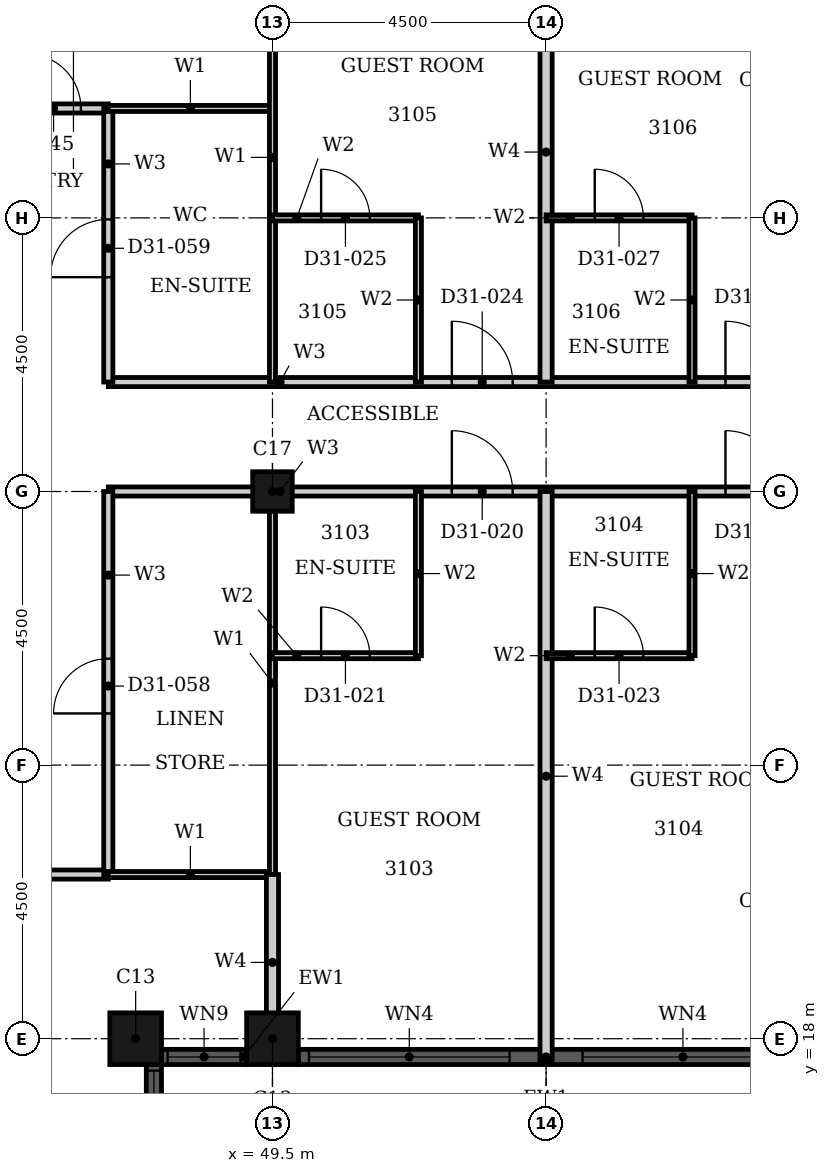
"""IFC4 building model, lengths in metres.
Left out: names, types, materials, properties, quantities, classifications, styles, units other than length and angle.
Written with IfcOpenShell. Run it as: python <this file> out.ifc"""

import sys

from ifc_helpers import new_model, si_unit, direction, frame, frame_2d, origin, origin_2d, place, context, subcontext, project, spatial, rectangle, hollow_rectangle, extrude, element, fill, save


model = new_model("IFC4")
c1 = context("Model", 3, precision=1e-05, world=origin(), true_north=direction((0.0, 1.0)))
c2 = subcontext(c1, "Body", "Model", "MODEL_VIEW")
j1 = project(units=[si_unit("LENGTHUNIT", "METRE"), si_unit("PLANEANGLEUNIT", "RADIAN")], contexts=[c1])
p1 = place(None, origin())
s1 = spatial("IfcSite", under=j1, at=p1, CompositionType="ELEMENT")
p2 = place(p1, origin())
s2 = spatial("IfcBuilding", under=s1, at=p2, CompositionType="ELEMENT")
p3 = place(p2, frame((0.0, 0.0, 126.0)))
s3 = spatial("IfcBuildingStorey", under=s2, at=p3, CompositionType="ELEMENT", Elevation=126.0)
for number, where, z_axis, x_axis in (
    (1, (47.25, 18.0, 0.0), (0.0, 0.0, 1.0), (1.0, 0.0, 0.0)),
    (2, (49.5, 18.0, 0.0), (0.0, 0.0, 1.0), (1.0, 0.0, 0.0)),
):
    element("IfcColumn", number, at=place(p3, frame(where, z_axis=z_axis, x_axis=x_axis)), inside=s3, PredefinedType="COLUMN", context=c2, shape_type="SweptSolid", body=[
        extrude(hollow_rectangle(XDim=0.85, YDim=0.85, WallThickness=0.026, at=origin_2d()), origin(), (0.0, 0.0, 1.0), 3.6),
    ])
p4 = place(p3, frame((49.5, 27.0, 0.0), z_axis=(0.0, 0.0, 1.0), x_axis=(1.0, 0.0, 0.0)))
e3 = element("IfcColumn", 3, at=p4, inside=s3, PredefinedType="COLUMN", context=c2, shape_type="SweptSolid", body=[
    extrude(hollow_rectangle(XDim=0.65, YDim=0.65, WallThickness=0.021, at=origin_2d()), origin(), (0.0, 0.0, 1.0), 3.6),
])
p5 = place(p3, frame((47.55, 16.175, 0.0), z_axis=(0.0, 0.0, 1.0), x_axis=(0.0, 1.0, 0.0)))
e4 = element("IfcWall", 4, at=p5, inside=s3, PredefinedType="SOLIDWALL", context=c2, shape_type="SweptSolid", body=[
    extrude(rectangle(XDim=1.4, YDim=0.25, at=frame_2d((0.7, 0.0))), origin(), (0.0, 0.0, 1.0), 3.6),
])
p6 = place(p5, frame((0.1, 0.0, 0.9)))
e5 = element("IfcOpeningElement", 5, at=p6, cuts=e4, PredefinedType="OPENING", context=c2, shape_type="SweptSolid", body=[
    extrude(rectangle(XDim=1.2, YDim=2.08, at=frame_2d((0.6, 1.04))), frame((0.0, 0.135, 0.0), z_axis=(0.0, -1.0, 0.0), x_axis=(1.0, 0.0, 0.0)), (0.0, 0.0, 1.0), 0.27),
])
p7 = place(p3, frame((47.675, 17.7, 0.0), z_axis=(0.0, 0.0, 1.0), x_axis=(1.0, 0.0, 0.0)))
e6 = element("IfcWall", 6, at=p7, inside=s3, PredefinedType="SOLIDWALL", context=c2, shape_type="SweptSolid", body=[
    extrude(rectangle(XDim=1.4, YDim=0.25, at=frame_2d((0.7, 0.0))), origin(), (0.0, 0.0, 1.0), 3.6),
])
p8 = place(p7, frame((0.1, 0.0, 0.9)))
e7 = element("IfcOpeningElement", 7, at=p8, cuts=e6, PredefinedType="OPENING", context=c2, shape_type="SweptSolid", body=[
    extrude(rectangle(XDim=1.2, YDim=2.08, at=frame_2d((0.6, 1.04))), frame((0.0, 0.135, 0.0), z_axis=(0.0, -1.0, 0.0), x_axis=(1.0, 0.0, 0.0)), (0.0, 0.0, 1.0), 0.27),
])
p9 = place(p3, frame((49.925, 17.7, 0.0), z_axis=(0.0, 0.0, 1.0), x_axis=(1.0, 0.0, 0.0)))
e8 = element("IfcWall", 8, at=p9, inside=s3, PredefinedType="SOLIDWALL", context=c2, shape_type="SweptSolid", body=[
    extrude(rectangle(XDim=8.15, YDim=0.25, at=frame_2d((4.075, 0.0))), origin(), (0.0, 0.0, 1.0), 3.6),
])
p10 = place(p9, frame((0.175, 0.0, 0.9)))
e9 = element("IfcOpeningElement", 9, at=p10, cuts=e8, PredefinedType="OPENING", context=c2, shape_type="SweptSolid", body=[
    extrude(rectangle(XDim=3.3, YDim=2.08, at=frame_2d((1.65, 1.04))), frame((0.0, 0.135, 0.0), z_axis=(0.0, -1.0, 0.0), x_axis=(1.0, 0.0, 0.0)), (0.0, 0.0, 1.0), 0.27),
])
p11 = place(p9, frame((4.675, 0.0, 0.9)))
e10 = element("IfcOpeningElement", 10, at=p11, cuts=e8, PredefinedType="OPENING", context=c2, shape_type="SweptSolid", body=[
    extrude(rectangle(XDim=3.3, YDim=2.08, at=frame_2d((1.65, 1.04))), frame((0.0, 0.135, 0.0), z_axis=(0.0, -1.0, 0.0), x_axis=(1.0, 0.0, 0.0)), (0.0, 0.0, 1.0), 0.27),
])
p12 = place(p3, frame((31.5, 20.7, 0.0), z_axis=(0.0, 0.0, 1.0), x_axis=(1.0, 0.0, 0.0)))
e11 = element("IfcWall", 11, at=p12, inside=s3, PredefinedType="PARTITIONING", context=c2, shape_type="SweptSolid", body=[
    extrude(rectangle(XDim=15.3, YDim=0.15, at=frame_2d((7.65, 0.0))), origin(), (0.0, 0.0, 1.0), 3.3),
])
p13 = place(p12, frame((11.95, 0.0, 0.0)))
e12 = element("IfcOpeningElement", 12, at=p13, cuts=e11, PredefinedType="OPENING", context=c2, shape_type="SweptSolid", body=[
    extrude(rectangle(XDim=1.0, YDim=2.1, at=frame_2d((0.5, 1.05))), frame((0.0, 0.085, 0.0), z_axis=(0.0, -1.0, 0.0), x_axis=(1.0, 0.0, 0.0)), (0.0, 0.0, 1.0), 0.17),
])
p14 = place(p12, frame((4.05, 0.0, 0.0)))
e13 = element("IfcOpeningElement", 13, at=p14, cuts=e11, PredefinedType="OPENING", context=c2, shape_type="SweptSolid", body=[
    extrude(rectangle(XDim=0.9, YDim=2.1, at=frame_2d((0.45, 1.05))), frame((0.0, 0.085, 0.0), z_axis=(0.0, -1.0, 0.0), x_axis=(1.0, 0.0, 0.0)), (0.0, 0.0, 1.0), 0.17),
])
p15 = place(p3, frame((46.8, 27.0, 0.0), z_axis=(0.0, 0.0, 1.0), x_axis=(1.0, 0.0, 0.0)))
e14 = element("IfcWall", 14, at=p15, inside=s3, PredefinedType="PARTITIONING", context=c2, shape_type="SweptSolid", body=[
    extrude(rectangle(XDim=11.7, YDim=0.15, at=frame_2d((5.85, 0.0))), origin(), (0.0, 0.0, 1.0), 2.58),
])
p16 = place(p15, frame((5.65, 0.0, 0.0)))
e15 = element("IfcOpeningElement", 15, at=p16, cuts=e14, PredefinedType="OPENING", context=c2, shape_type="SweptSolid", body=[
    extrude(rectangle(XDim=1.0, YDim=2.1, at=frame_2d((0.5, 1.05))), frame((0.0, 0.085, 0.0), z_axis=(0.0, -1.0, 0.0), x_axis=(1.0, 0.0, 0.0)), (0.0, 0.0, 1.0), 0.17),
])
p17 = place(p15, frame((10.15, 0.0, 0.0)))
e16 = element("IfcOpeningElement", 16, at=p17, cuts=e14, PredefinedType="OPENING", context=c2, shape_type="SweptSolid", body=[
    extrude(rectangle(XDim=1.0, YDim=2.1, at=frame_2d((0.5, 1.05))), frame((0.0, 0.085, 0.0), z_axis=(0.0, -1.0, 0.0), x_axis=(1.0, 0.0, 0.0)), (0.0, 0.0, 1.0), 0.17),
])
p18 = place(p3, frame((46.8, 28.8, 0.0), z_axis=(0.0, 0.0, 1.0), x_axis=(1.0, 0.0, 0.0)))
e17 = element("IfcWall", 17, at=p18, inside=s3, PredefinedType="PARTITIONING", context=c2, shape_type="SweptSolid", body=[
    extrude(rectangle(XDim=11.7, YDim=0.15, at=frame_2d((5.85, 0.0))), origin(), (0.0, 0.0, 1.0), 3.3),
])
p19 = place(p18, frame((5.65, 0.0, 0.0)))
e18 = element("IfcOpeningElement", 18, at=p19, cuts=e17, PredefinedType="OPENING", context=c2, shape_type="SweptSolid", body=[
    extrude(rectangle(XDim=1.0, YDim=2.1, at=frame_2d((0.5, 1.05))), frame((0.0, 0.085, 0.0), z_axis=(0.0, -1.0, 0.0), x_axis=(1.0, 0.0, 0.0)), (0.0, 0.0, 1.0), 0.17),
])
p20 = place(p18, frame((10.15, 0.0, 0.0)))
e19 = element("IfcOpeningElement", 19, at=p20, cuts=e17, PredefinedType="OPENING", context=c2, shape_type="SweptSolid", body=[
    extrude(rectangle(XDim=1.0, YDim=2.1, at=frame_2d((0.5, 1.05))), frame((0.0, 0.085, 0.0), z_axis=(0.0, -1.0, 0.0), x_axis=(1.0, 0.0, 0.0)), (0.0, 0.0, 1.0), 0.17),
])
p21 = place(p3, frame((40.5, 33.3, 0.0), z_axis=(0.0, 0.0, 1.0), x_axis=(1.0, 0.0, 0.0)))
e20 = element("IfcWall", 20, at=p21, inside=s3, PredefinedType="PARTITIONING", context=c2, shape_type="SweptSolid", body=[
    extrude(rectangle(XDim=6.3, YDim=0.15, at=frame_2d((3.15, 0.0))), origin(), (0.0, 0.0, 1.0), 3.3),
])
p22 = place(p21, frame((2.95, 0.0, 0.0)))
e21 = element("IfcOpeningElement", 21, at=p22, cuts=e20, PredefinedType="OPENING", context=c2, shape_type="SweptSolid", body=[
    extrude(rectangle(XDim=1.0, YDim=2.1, at=frame_2d((0.5, 1.05))), frame((0.0, 0.085, 0.0), z_axis=(0.0, -1.0, 0.0), x_axis=(1.0, 0.0, 0.0)), (0.0, 0.0, 1.0), 0.17),
])
p23 = place(p21, frame((4.95, 0.0, 0.0)))
e22 = element("IfcOpeningElement", 22, at=p23, cuts=e20, PredefinedType="OPENING", context=c2, shape_type="SweptSolid", body=[
    extrude(rectangle(XDim=0.9, YDim=2.1, at=frame_2d((0.45, 1.05))), frame((0.0, 0.085, 0.0), z_axis=(0.0, -1.0, 0.0), x_axis=(1.0, 0.0, 0.0)), (0.0, 0.0, 1.0), 0.17),
])
p24 = place(p3, frame((46.8, 28.8, 0.0), z_axis=(0.0, 0.0, 1.0), x_axis=(0.0, 1.0, 0.0)))
e23 = element("IfcWall", 23, at=p24, inside=s3, PredefinedType="PARTITIONING", context=c2, shape_type="SweptSolid", body=[
    extrude(rectangle(XDim=4.5, YDim=0.15, at=frame_2d((2.25, 0.0))), origin(), (0.0, 0.0, 1.0), 3.3),
])
p25 = place(p24, frame((1.725, 0.0, 0.0)))
e24 = element("IfcOpeningElement", 24, at=p25, cuts=e23, PredefinedType="OPENING", context=c2, shape_type="SweptSolid", body=[
    extrude(rectangle(XDim=0.95, YDim=2.1, at=frame_2d((0.475, 1.05))), frame((0.0, 0.085, 0.0), z_axis=(0.0, -1.0, 0.0), x_axis=(1.0, 0.0, 0.0)), (0.0, 0.0, 1.0), 0.17),
])
p26 = place(p3, frame((46.8, 20.7, 0.0), z_axis=(0.0, 0.0, 1.0), x_axis=(0.0, 1.0, 0.0)))
e25 = element("IfcWall", 25, at=p26, inside=s3, PredefinedType="PARTITIONING", context=c2, shape_type="SweptSolid", body=[
    extrude(rectangle(XDim=6.3, YDim=0.15, at=frame_2d((3.15, 0.0))), origin(), (0.0, 0.0, 1.0), 3.3),
])
p27 = place(p26, frame((2.65, 0.0, 0.0)))
e26 = element("IfcOpeningElement", 26, at=p27, cuts=e25, PredefinedType="OPENING", context=c2, shape_type="SweptSolid", body=[
    extrude(rectangle(XDim=0.9, YDim=2.1, at=frame_2d((0.45, 1.05))), frame((0.0, 0.085, 0.0), z_axis=(0.0, -1.0, 0.0), x_axis=(1.0, 0.0, 0.0)), (0.0, 0.0, 1.0), 0.17),
])
for number, where, z_axis, x_axis in (
    (27, (46.8, 20.7, 0.0), (0.0, 0.0, 1.0), (1.0, 0.0, 0.0)),
    (28, (46.8, 33.3, 0.0), (0.0, 0.0, 1.0), (1.0, 0.0, 0.0)),
):
    element("IfcWall", number, at=place(p3, frame(where, z_axis=z_axis, x_axis=x_axis)), inside=s3, PredefinedType="PARTITIONING", context=c2, shape_type="SweptSolid", body=[
        extrude(rectangle(XDim=2.7, YDim=0.1, at=frame_2d((1.35, 0.0))), origin(), (0.0, 0.0, 1.0), 3.3),
    ])
p28 = place(p3, frame((49.5, 28.8, 0.0), z_axis=(0.0, 0.0, 1.0), x_axis=(0.0, 1.0, 0.0)))
e29 = element("IfcWall", 29, at=p28, inside=s3, PredefinedType="PARTITIONING", context=c2, shape_type="SweptSolid", body=[
    extrude(rectangle(XDim=7.39, YDim=0.1, at=frame_2d((3.695, 0.0))), origin(), (0.0, 0.0, 1.0), 2.38),
])
p29 = place(p3, frame((49.5, 20.7, 0.0), z_axis=(0.0, 0.0, 1.0), x_axis=(0.0, 1.0, 0.0)))
e30 = element("IfcWall", 30, at=p29, inside=s3, PredefinedType="PARTITIONING", context=c2, shape_type="SweptSolid", body=[
    extrude(rectangle(XDim=6.3, YDim=0.1, at=frame_2d((3.15, 0.0))), origin(), (0.0, 0.0, 1.0), 2.38),
])
p30 = place(p3, frame((49.5, 17.81, 0.0), z_axis=(0.0, 0.0, 1.0), x_axis=(0.0, 1.0, 0.0)))
e31 = element("IfcWall", 31, at=p30, inside=s3, PredefinedType="PARTITIONING", context=c2, shape_type="SweptSolid", body=[
    extrude(rectangle(XDim=2.89, YDim=0.2, at=frame_2d((1.445, 0.0))), origin(), (0.0, 0.0, 1.0), 2.38),
])
p31 = place(p3, frame((54.0, 28.8, 0.0), z_axis=(0.0, 0.0, 1.0), x_axis=(0.0, 1.0, 0.0)))
e32 = element("IfcWall", 32, at=p31, inside=s3, PredefinedType="PARTITIONING", context=c2, shape_type="SweptSolid", body=[
    extrude(rectangle(XDim=7.565, YDim=0.2, at=frame_2d((3.782, 0.0))), origin(), (0.0, 0.0, 1.0), 3.3),
])
p32 = place(p3, frame((54.0, 17.635, 0.0), z_axis=(0.0, 0.0, 1.0), x_axis=(0.0, 1.0, 0.0)))
e33 = element("IfcWall", 33, at=p32, inside=s3, PredefinedType="PARTITIONING", context=c2, shape_type="SweptSolid", body=[
    extrude(rectangle(XDim=9.365, YDim=0.2, at=frame_2d((4.683, 0.0))), origin(), (0.0, 0.0, 1.0), 3.3),
])
p33 = place(p3, frame((49.5, 24.3, 0.0), z_axis=(0.0, 0.0, 1.0), x_axis=(1.0, 0.0, 0.0)))
e34 = element("IfcWall", 34, at=p33, inside=s3, PredefinedType="PARTITIONING", context=c2, shape_type="SweptSolid", body=[
    extrude(rectangle(XDim=2.4, YDim=0.1, at=frame_2d((1.2, 0.0))), origin(), (0.0, 0.0, 1.0), 3.3),
])
p34 = place(p33, frame((0.8, 0.0, 0.0)))
e35 = element("IfcOpeningElement", 35, at=p34, cuts=e34, PredefinedType="OPENING", context=c2, shape_type="SweptSolid", body=[
    extrude(rectangle(XDim=0.8, YDim=2.1, at=frame_2d((0.4, 1.05))), frame((0.0, 0.06, 0.0), z_axis=(0.0, -1.0, 0.0), x_axis=(1.0, 0.0, 0.0)), (0.0, 0.0, 1.0), 0.12),
])
p35 = place(p3, frame((54.0, 24.3, 0.0), z_axis=(0.0, 0.0, 1.0), x_axis=(1.0, 0.0, 0.0)))
e36 = element("IfcWall", 36, at=p35, inside=s3, PredefinedType="PARTITIONING", context=c2, shape_type="SweptSolid", body=[
    extrude(rectangle(XDim=2.4, YDim=0.1, at=frame_2d((1.2, 0.0))), origin(), (0.0, 0.0, 1.0), 3.3),
])
p36 = place(p35, frame((0.8, 0.0, 0.0)))
e37 = element("IfcOpeningElement", 37, at=p36, cuts=e36, PredefinedType="OPENING", context=c2, shape_type="SweptSolid", body=[
    extrude(rectangle(XDim=0.8, YDim=2.1, at=frame_2d((0.4, 1.05))), frame((0.0, 0.06, 0.0), z_axis=(0.0, -1.0, 0.0), x_axis=(1.0, 0.0, 0.0)), (0.0, 0.0, 1.0), 0.12),
])
p37 = place(p3, frame((49.5, 31.5, 0.0), z_axis=(0.0, 0.0, 1.0), x_axis=(1.0, 0.0, 0.0)))
e38 = element("IfcWall", 38, at=p37, inside=s3, PredefinedType="PARTITIONING", context=c2, shape_type="SweptSolid", body=[
    extrude(rectangle(XDim=2.4, YDim=0.1, at=frame_2d((1.2, 0.0))), origin(), (0.0, 0.0, 1.0), 2.58),
])
p38 = place(p37, frame((0.8, 0.0, 0.0)))
e39 = element("IfcOpeningElement", 39, at=p38, cuts=e38, PredefinedType="OPENING", context=c2, shape_type="SweptSolid", body=[
    extrude(rectangle(XDim=0.8, YDim=2.1, at=frame_2d((0.4, 1.05))), frame((0.0, 0.06, 0.0), z_axis=(0.0, -1.0, 0.0), x_axis=(1.0, 0.0, 0.0)), (0.0, 0.0, 1.0), 0.12),
])
p39 = place(p3, frame((54.0, 31.5, 0.0), z_axis=(0.0, 0.0, 1.0), x_axis=(1.0, 0.0, 0.0)))
e40 = element("IfcWall", 40, at=p39, inside=s3, PredefinedType="PARTITIONING", context=c2, shape_type="SweptSolid", body=[
    extrude(rectangle(XDim=2.4, YDim=0.1, at=frame_2d((1.2, 0.0))), origin(), (0.0, 0.0, 1.0), 2.58),
])
p40 = place(p39, frame((0.8, 0.0, 0.0)))
e41 = element("IfcOpeningElement", 41, at=p40, cuts=e40, PredefinedType="OPENING", context=c2, shape_type="SweptSolid", body=[
    extrude(rectangle(XDim=0.8, YDim=2.1, at=frame_2d((0.4, 1.05))), frame((0.0, 0.06, 0.0), z_axis=(0.0, -1.0, 0.0), x_axis=(1.0, 0.0, 0.0)), (0.0, 0.0, 1.0), 0.12),
])
for number, where, z_axis, x_axis in (
    (42, (51.9, 28.8, 0.0), (0.0, 0.0, 1.0), (0.0, 1.0, 0.0)),
    (43, (51.9, 24.3, 0.0), (0.0, 0.0, 1.0), (0.0, 1.0, 0.0)),
    (44, (56.4, 28.8, 0.0), (0.0, 0.0, 1.0), (0.0, 1.0, 0.0)),
    (45, (56.4, 24.3, 0.0), (0.0, 0.0, 1.0), (0.0, 1.0, 0.0)),
):
    element("IfcWall", number, at=place(p3, frame(where, z_axis=z_axis, x_axis=x_axis)), inside=s3, PredefinedType="PARTITIONING", context=c2, shape_type="SweptSolid", body=[
        extrude(rectangle(XDim=2.7, YDim=0.1, at=frame_2d((1.35, 0.0))), origin(), (0.0, 0.0, 1.0), 3.3),
    ])
p41 = place(p6, origin())
e46 = element("IfcWindow", 46, at=p41, inside=s3, PartitioningType="SINGLE_PANEL", PredefinedType="WINDOW", context=c2, shape_type="SweptSolid", body=[
    extrude(rectangle(XDim=1.2, YDim=2.08, at=frame_2d((0.6, 1.04))), frame((0.0, 0.03, 0.0), z_axis=(0.0, -1.0, 0.0), x_axis=(1.0, 0.0, 0.0)), (0.0, 0.0, 1.0), 0.06),
])
fill(e5, e46)
p42 = place(p8, origin())
e47 = element("IfcWindow", 47, at=p42, inside=s3, PartitioningType="SINGLE_PANEL", PredefinedType="WINDOW", context=c2, shape_type="SweptSolid", body=[
    extrude(rectangle(XDim=1.2, YDim=2.08, at=frame_2d((0.6, 1.04))), frame((0.0, 0.03, 0.0), z_axis=(0.0, -1.0, 0.0), x_axis=(1.0, 0.0, 0.0)), (0.0, 0.0, 1.0), 0.06),
])
fill(e7, e47)
p43 = place(p10, origin())
e48 = element("IfcWindow", 48, at=p43, inside=s3, PartitioningType="SINGLE_PANEL", PredefinedType="WINDOW", context=c2, shape_type="SweptSolid", body=[
    extrude(rectangle(XDim=3.3, YDim=2.08, at=frame_2d((1.65, 1.04))), frame((0.0, 0.03, 0.0), z_axis=(0.0, -1.0, 0.0), x_axis=(1.0, 0.0, 0.0)), (0.0, 0.0, 1.0), 0.06),
])
fill(e9, e48)
p44 = place(p11, origin())
e49 = element("IfcWindow", 49, at=p44, inside=s3, PartitioningType="SINGLE_PANEL", PredefinedType="WINDOW", context=c2, shape_type="SweptSolid", body=[
    extrude(rectangle(XDim=3.3, YDim=2.08, at=frame_2d((1.65, 1.04))), frame((0.0, 0.03, 0.0), z_axis=(0.0, -1.0, 0.0), x_axis=(1.0, 0.0, 0.0)), (0.0, 0.0, 1.0), 0.06),
])
fill(e10, e49)
p45 = place(p16, origin())
e50 = element("IfcDoor", 50, at=p45, inside=s3, OperationType="SINGLE_SWING_RIGHT", PredefinedType="DOOR", context=c2, shape_type="SweptSolid", body=[
    extrude(rectangle(XDim=1.0, YDim=2.1, at=frame_2d((0.5, 1.05))), frame((0.0, 0.025, 0.0), z_axis=(0.0, -1.0, 0.0), x_axis=(1.0, 0.0, 0.0)), (0.0, 0.0, 1.0), 0.05),
])
fill(e15, e50)
p46 = place(p34, origin())
e51 = element("IfcDoor", 51, at=p46, inside=s3, OperationType="SINGLE_SWING_RIGHT", PredefinedType="DOOR", context=c2, shape_type="SweptSolid", body=[
    extrude(rectangle(XDim=0.8, YDim=2.1, at=frame_2d((0.4, 1.05))), frame((0.0, 0.025, 0.0), z_axis=(0.0, -1.0, 0.0), x_axis=(1.0, 0.0, 0.0)), (0.0, 0.0, 1.0), 0.05),
])
fill(e35, e51)
p47 = place(p17, origin())
e52 = element("IfcDoor", 52, at=p47, inside=s3, OperationType="SINGLE_SWING_RIGHT", PredefinedType="DOOR", context=c2, shape_type="SweptSolid", body=[
    extrude(rectangle(XDim=1.0, YDim=2.1, at=frame_2d((0.5, 1.05))), frame((0.0, 0.025, 0.0), z_axis=(0.0, -1.0, 0.0), x_axis=(1.0, 0.0, 0.0)), (0.0, 0.0, 1.0), 0.05),
])
fill(e16, e52)
p48 = place(p36, origin())
e53 = element("IfcDoor", 53, at=p48, inside=s3, OperationType="SINGLE_SWING_LEFT", PredefinedType="DOOR", context=c2, shape_type="SweptSolid", body=[
    extrude(rectangle(XDim=0.8, YDim=2.1, at=frame_2d((0.4, 1.05))), frame((0.0, 0.025, 0.0), z_axis=(0.0, -1.0, 0.0), x_axis=(1.0, 0.0, 0.0)), (0.0, 0.0, 1.0), 0.05),
])
fill(e37, e53)
p49 = place(p19, origin())
e54 = element("IfcDoor", 54, at=p49, inside=s3, OperationType="SINGLE_SWING_RIGHT", PredefinedType="DOOR", context=c2, shape_type="SweptSolid", body=[
    extrude(rectangle(XDim=1.0, YDim=2.1, at=frame_2d((0.5, 1.05))), frame((0.0, 0.025, 0.0), z_axis=(0.0, -1.0, 0.0), x_axis=(1.0, 0.0, 0.0)), (0.0, 0.0, 1.0), 0.05),
])
fill(e18, e54)
p50 = place(p38, origin())
e55 = element("IfcDoor", 55, at=p50, inside=s3, OperationType="SINGLE_SWING_RIGHT", PredefinedType="DOOR", context=c2, shape_type="SweptSolid", body=[
    extrude(rectangle(XDim=0.8, YDim=2.1, at=frame_2d((0.4, 1.05))), frame((0.0, 0.025, 0.0), z_axis=(0.0, -1.0, 0.0), x_axis=(1.0, 0.0, 0.0)), (0.0, 0.0, 1.0), 0.05),
])
fill(e39, e55)
p51 = place(p20, origin())
e56 = element("IfcDoor", 56, at=p51, inside=s3, OperationType="SINGLE_SWING_RIGHT", PredefinedType="DOOR", context=c2, shape_type="SweptSolid", body=[
    extrude(rectangle(XDim=1.0, YDim=2.1, at=frame_2d((0.5, 1.05))), frame((0.0, 0.025, 0.0), z_axis=(0.0, -1.0, 0.0), x_axis=(1.0, 0.0, 0.0)), (0.0, 0.0, 1.0), 0.05),
])
fill(e19, e56)
p52 = place(p40, origin())
e57 = element("IfcDoor", 57, at=p52, inside=s3, OperationType="SINGLE_SWING_LEFT", PredefinedType="DOOR", context=c2, shape_type="SweptSolid", body=[
    extrude(rectangle(XDim=0.8, YDim=2.1, at=frame_2d((0.4, 1.05))), frame((0.0, 0.025, 0.0), z_axis=(0.0, -1.0, 0.0), x_axis=(1.0, 0.0, 0.0)), (0.0, 0.0, 1.0), 0.05),
])
fill(e41, e57)
p53 = place(p23, origin())
e58 = element("IfcDoor", 58, at=p53, inside=s3, OperationType="SINGLE_SWING_LEFT", PredefinedType="DOOR", context=c2, shape_type="SweptSolid", body=[
    extrude(rectangle(XDim=0.9, YDim=2.1, at=frame_2d((0.45, 1.05))), frame((0.0, 0.025, 0.0), z_axis=(0.0, -1.0, 0.0), x_axis=(1.0, 0.0, 0.0)), (0.0, 0.0, 1.0), 0.05),
])
fill(e22, e58)
p54 = place(p27, origin())
e59 = element("IfcDoor", 59, at=p54, inside=s3, OperationType="SINGLE_SWING_RIGHT", PredefinedType="DOOR", context=c2, shape_type="SweptSolid", body=[
    extrude(rectangle(XDim=0.9, YDim=2.1, at=frame_2d((0.45, 1.05))), frame((0.0, 0.025, 0.0), z_axis=(0.0, -1.0, 0.0), x_axis=(1.0, 0.0, 0.0)), (0.0, 0.0, 1.0), 0.05),
])
fill(e26, e59)
p55 = place(p25, origin())
e60 = element("IfcDoor", 60, at=p55, inside=s3, OperationType="SINGLE_SWING_RIGHT", PredefinedType="DOOR", context=c2, shape_type="SweptSolid", body=[
    extrude(rectangle(XDim=0.95, YDim=2.1, at=frame_2d((0.475, 1.05))), frame((0.0, 0.025, 0.0), z_axis=(0.0, -1.0, 0.0), x_axis=(1.0, 0.0, 0.0)), (0.0, 0.0, 1.0), 0.05),
])
fill(e24, e60)
save(model, sys.argv[1])
